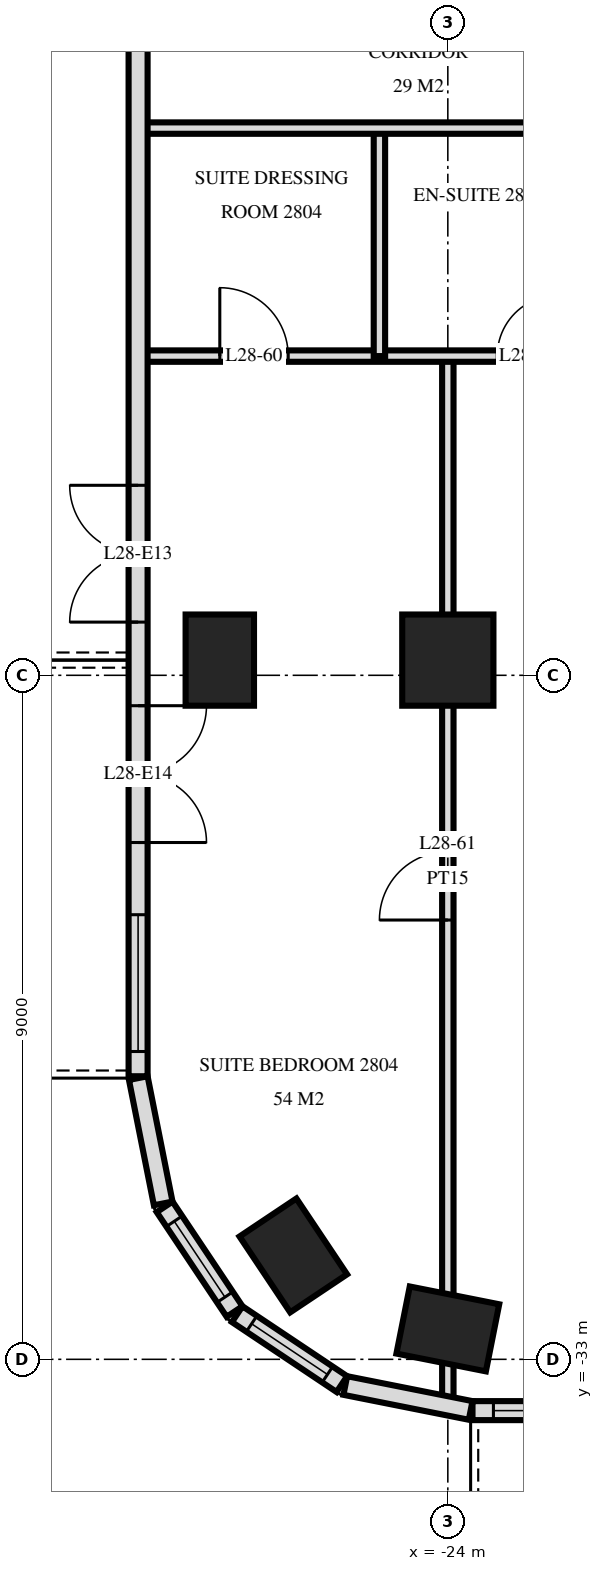
"""IFC4 building model, lengths in metres.
Left out: names, types, materials, properties, quantities, classifications, styles, units other than length and angle.
Written with IfcOpenShell. Run it as: python <this file> out.ifc"""

import sys

from ifc_helpers import new_model, si_unit, direction, frame, frame_2d, origin, origin_2d, place, context, subcontext, project, spatial, rectangle, extrude, element, fill, save


model = new_model("IFC4")
c1 = context("Model", 3, precision=1e-05, world=origin(), true_north=direction((0.0, 1.0)))
c2 = subcontext(c1, "Body", "Model", "MODEL_VIEW")
j1 = project(units=[si_unit("LENGTHUNIT", "METRE"), si_unit("PLANEANGLEUNIT", "RADIAN")], contexts=[c1])
p1 = place(None, origin())
s1 = spatial("IfcSite", under=j1, at=p1, CompositionType="ELEMENT")
p2 = place(p1, origin())
s2 = spatial("IfcBuilding", under=s1, at=p2, CompositionType="ELEMENT")
p3 = place(p2, frame((0.0, 0.0, 112.8)))
s3 = spatial("IfcBuildingStorey", under=s2, at=p3, CompositionType="ELEMENT", Elevation=112.8)
for number, where, z_axis, x_axis in (
    (1, (-27.0, -23.8, -0.28), (0.0, 0.0, 1.0), (0.0, 1.0, 0.0)),
    (2, (-26.033, -31.633, -0.28), (0.0, 0.0, 1.0), (-0.556, 0.831, 0.0)),
    (3, (-24.0, -32.6, -0.28), (0.0, 0.0, 1.0), (-0.981, 0.195, 0.0)),
):
    element("IfcColumn", number, at=place(p3, frame(where, z_axis=z_axis, x_axis=x_axis)), inside=s3, PredefinedType="COLUMN", context=c2, shape_type="SweptSolid", body=[
        extrude(rectangle(XDim=1.2, YDim=0.9, at=origin_2d()), origin(), (0.0, 0.0, 1.0), 3.88),
    ])
p4 = place(p3, frame((-24.0, -23.8, -0.28), z_axis=(0.0, 0.0, 1.0), x_axis=(1.0, 0.0, 0.0)))
e4 = element("IfcColumn", 4, at=p4, inside=s3, PredefinedType="COLUMN", context=c2, shape_type="SweptSolid", body=[
    extrude(rectangle(XDim=1.2, YDim=1.2, at=origin_2d()), origin(), (0.0, 0.0, 1.0), 3.88),
])
p5 = place(p3, frame((-28.075, -3.325, 0.0), z_axis=(0.0, 0.0, 1.0), x_axis=(0.0, -1.0, 0.0)))
e5 = element("IfcWall", 5, at=p5, inside=s3, PredefinedType="SOLIDWALL", context=c2, shape_type="SweptSolid", body=[
    extrude(rectangle(XDim=25.951, YDim=0.25, at=frame_2d((12.975, 0.0))), origin(), (0.0, 0.0, 1.0), 3.32),
])
p6 = place(p5, frame((7.025, 0.0, 0.0)))
e6 = element("IfcOpeningElement", 6, at=p6, cuts=e5, PredefinedType="OPENING", context=c2, shape_type="SweptSolid", body=[
    extrude(rectangle(XDim=1.8, YDim=2.4, at=frame_2d((0.9, 1.2))), frame((0.0, 0.135, 0.0), z_axis=(0.0, -1.0, 0.0), x_axis=(1.0, 0.0, 0.0)), (0.0, 0.0, 1.0), 0.27),
])
p7 = place(p5, frame((18.175, 0.0, 0.0)))
e7 = element("IfcOpeningElement", 7, at=p7, cuts=e5, PredefinedType="OPENING", context=c2, shape_type="SweptSolid", body=[
    extrude(rectangle(XDim=1.8, YDim=2.4, at=frame_2d((0.9, 1.2))), frame((0.0, 0.135, 0.0), z_axis=(0.0, -1.0, 0.0), x_axis=(1.0, 0.0, 0.0)), (0.0, 0.0, 1.0), 0.27),
])
p8 = place(p5, frame((21.075, 0.0, 0.0)))
e8 = element("IfcOpeningElement", 8, at=p8, cuts=e5, PredefinedType="OPENING", context=c2, shape_type="SweptSolid", body=[
    extrude(rectangle(XDim=1.8, YDim=2.4, at=frame_2d((0.9, 1.2))), frame((0.0, 0.135, 0.0), z_axis=(0.0, -1.0, 0.0), x_axis=(1.0, 0.0, 0.0)), (0.0, 0.0, 1.0), 0.27),
])
p9 = place(p5, frame((23.825, 0.0, 0.3)))
e9 = element("IfcOpeningElement", 9, at=p9, cuts=e5, PredefinedType="OPENING", context=c2, shape_type="SweptSolid", body=[
    extrude(rectangle(XDim=1.8, YDim=2.1, at=frame_2d((0.9, 1.05))), frame((0.0, 0.135, 0.0), z_axis=(0.0, -1.0, 0.0), x_axis=(1.0, 0.0, 0.0)), (0.0, 0.0, 1.0), 0.27),
])
p10 = place(p3, frame((-28.073, -29.3, 0.0), z_axis=(0.0, 0.0, 1.0), x_axis=(0.194999110559, -0.980803419081, 0.0)))
e10 = element("IfcWall", 10, at=p10, inside=s3, PredefinedType="SOLIDWALL", context=c2, shape_type="SweptSolid", body=[
    extrude(rectangle(XDim=1.681, YDim=0.25, at=frame_2d((0.841, 0.0))), origin(), (0.0, 0.0, 1.0), 3.32),
])
p11 = place(p3, frame((-27.726, -30.994, 0.0), z_axis=(0.0, 0.0, 1.0), x_axis=(0.55555029066, -0.831482937015, 0.0)))
e11 = element("IfcWall", 11, at=p11, inside=s3, PredefinedType="SOLIDWALL", context=c2, shape_type="SweptSolid", body=[
    extrude(rectangle(XDim=1.656, YDim=0.25, at=frame_2d((0.828, 0.0))), origin(), (0.0, 0.0, 1.0), 3.32),
])
p12 = place(p11, frame((0.228, 0.0, 0.9)))
e12 = element("IfcOpeningElement", 12, at=p12, cuts=e11, PredefinedType="OPENING", context=c2, shape_type="SweptSolid", body=[
    extrude(rectangle(XDim=1.2, YDim=1.5, at=frame_2d((0.6, 0.75))), frame((0.0, 0.135, 0.0), z_axis=(0.0, -1.0, 0.0), x_axis=(1.0, 0.0, 0.0)), (0.0, 0.0, 1.0), 0.27),
])
p13 = place(p3, frame((-26.771, -32.406, 0.0), z_axis=(0.0, 0.0, 1.0), x_axis=(0.831482937015, -0.55555029066, 0.0)))
e13 = element("IfcWall", 13, at=p13, inside=s3, PredefinedType="SOLIDWALL", context=c2, shape_type="SweptSolid", body=[
    extrude(rectangle(XDim=1.656, YDim=0.25, at=frame_2d((0.828, 0.0))), origin(), (0.0, 0.0, 1.0), 3.32),
])
p14 = place(p13, frame((0.228, 0.0, 0.9)))
e14 = element("IfcOpeningElement", 14, at=p14, cuts=e13, PredefinedType="OPENING", context=c2, shape_type="SweptSolid", body=[
    extrude(rectangle(XDim=1.2, YDim=1.5, at=frame_2d((0.6, 0.75))), frame((0.0, 0.135, 0.0), z_axis=(0.0, -1.0, 0.0), x_axis=(1.0, 0.0, 0.0)), (0.0, 0.0, 1.0), 0.27),
])
p15 = place(p3, frame((-25.349, -33.344, 0.0), z_axis=(0.0, 0.0, 1.0), x_axis=(0.980775640221, -0.19513878023, 0.0)))
e15 = element("IfcWall", 15, at=p15, inside=s3, PredefinedType="SOLIDWALL", context=c2, shape_type="SweptSolid", body=[
    extrude(rectangle(XDim=1.681, YDim=0.25, at=frame_2d((0.841, 0.0))), origin(), (0.0, 0.0, 1.0), 3.32),
])
p16 = place(p3, frame((-23.675, -33.675, 0.0), z_axis=(0.0, 0.0, 1.0), x_axis=(1.0, 0.0, 0.0)))
e16 = element("IfcWall", 16, at=p16, inside=s3, PredefinedType="SOLIDWALL", context=c2, shape_type="SweptSolid", body=[
    extrude(rectangle(XDim=47.351, YDim=0.25, at=frame_2d((23.675, 0.0))), origin(), (0.0, 0.0, 1.0), 3.32),
])
p17 = place(p16, frame((0.275, 0.0, 0.3)))
e17 = element("IfcOpeningElement", 17, at=p17, cuts=e16, PredefinedType="OPENING", context=c2, shape_type="SweptSolid", body=[
    extrude(rectangle(XDim=2.4, YDim=2.1, at=frame_2d((1.2, 1.05))), frame((0.0, 0.135, 0.0), z_axis=(0.0, -1.0, 0.0), x_axis=(1.0, 0.0, 0.0)), (0.0, 0.0, 1.0), 0.27),
])
p18 = place(p16, frame((3.425, 0.0, 0.0)))
e18 = element("IfcOpeningElement", 18, at=p18, cuts=e16, PredefinedType="OPENING", context=c2, shape_type="SweptSolid", body=[
    extrude(rectangle(XDim=1.8, YDim=2.4, at=frame_2d((0.9, 1.2))), frame((0.0, 0.135, 0.0), z_axis=(0.0, -1.0, 0.0), x_axis=(1.0, 0.0, 0.0)), (0.0, 0.0, 1.0), 0.27),
])
p19 = place(p16, frame((5.975, 0.0, 0.3)))
e19 = element("IfcOpeningElement", 19, at=p19, cuts=e16, PredefinedType="OPENING", context=c2, shape_type="SweptSolid", body=[
    extrude(rectangle(XDim=2.4, YDim=2.1, at=frame_2d((1.2, 1.05))), frame((0.0, 0.135, 0.0), z_axis=(0.0, -1.0, 0.0), x_axis=(1.0, 0.0, 0.0)), (0.0, 0.0, 1.0), 0.27),
])
p20 = place(p16, frame((9.275, 0.0, 0.0)))
e20 = element("IfcOpeningElement", 20, at=p20, cuts=e16, PredefinedType="OPENING", context=c2, shape_type="SweptSolid", body=[
    extrude(rectangle(XDim=1.8, YDim=2.4, at=frame_2d((0.9, 1.2))), frame((0.0, 0.135, 0.0), z_axis=(0.0, -1.0, 0.0), x_axis=(1.0, 0.0, 0.0)), (0.0, 0.0, 1.0), 0.27),
])
p21 = place(p16, frame((12.275, 0.0, 0.0)))
e21 = element("IfcOpeningElement", 21, at=p21, cuts=e16, PredefinedType="OPENING", context=c2, shape_type="SweptSolid", body=[
    extrude(rectangle(XDim=1.8, YDim=2.4, at=frame_2d((0.9, 1.2))), frame((0.0, 0.135, 0.0), z_axis=(0.0, -1.0, 0.0), x_axis=(1.0, 0.0, 0.0)), (0.0, 0.0, 1.0), 0.27),
])
p22 = place(p16, frame((14.975, 0.0, 0.3)))
e22 = element("IfcOpeningElement", 22, at=p22, cuts=e16, PredefinedType="OPENING", context=c2, shape_type="SweptSolid", body=[
    extrude(rectangle(XDim=2.4, YDim=2.1, at=frame_2d((1.2, 1.05))), frame((0.0, 0.135, 0.0), z_axis=(0.0, -1.0, 0.0), x_axis=(1.0, 0.0, 0.0)), (0.0, 0.0, 1.0), 0.27),
])
p23 = place(p16, frame((17.975, 0.0, 0.3)))
e23 = element("IfcOpeningElement", 23, at=p23, cuts=e16, PredefinedType="OPENING", context=c2, shape_type="SweptSolid", body=[
    extrude(rectangle(XDim=2.4, YDim=2.1, at=frame_2d((1.2, 1.05))), frame((0.0, 0.135, 0.0), z_axis=(0.0, -1.0, 0.0), x_axis=(1.0, 0.0, 0.0)), (0.0, 0.0, 1.0), 0.27),
])
p24 = place(p16, frame((21.275, 0.0, 0.0)))
e24 = element("IfcOpeningElement", 24, at=p24, cuts=e16, PredefinedType="OPENING", context=c2, shape_type="SweptSolid", body=[
    extrude(rectangle(XDim=1.8, YDim=2.4, at=frame_2d((0.9, 1.2))), frame((0.0, 0.135, 0.0), z_axis=(0.0, -1.0, 0.0), x_axis=(1.0, 0.0, 0.0)), (0.0, 0.0, 1.0), 0.27),
])
p25 = place(p16, frame((24.275, 0.0, 0.0)))
e25 = element("IfcOpeningElement", 25, at=p25, cuts=e16, PredefinedType="OPENING", context=c2, shape_type="SweptSolid", body=[
    extrude(rectangle(XDim=1.8, YDim=2.4, at=frame_2d((0.9, 1.2))), frame((0.0, 0.135, 0.0), z_axis=(0.0, -1.0, 0.0), x_axis=(1.0, 0.0, 0.0)), (0.0, 0.0, 1.0), 0.27),
])
p26 = place(p16, frame((26.975, 0.0, 0.3)))
e26 = element("IfcOpeningElement", 26, at=p26, cuts=e16, PredefinedType="OPENING", context=c2, shape_type="SweptSolid", body=[
    extrude(rectangle(XDim=2.4, YDim=2.1, at=frame_2d((1.2, 1.05))), frame((0.0, 0.135, 0.0), z_axis=(0.0, -1.0, 0.0), x_axis=(1.0, 0.0, 0.0)), (0.0, 0.0, 1.0), 0.27),
])
p27 = place(p16, frame((30.275, 0.0, 0.0)))
e27 = element("IfcOpeningElement", 27, at=p27, cuts=e16, PredefinedType="OPENING", context=c2, shape_type="SweptSolid", body=[
    extrude(rectangle(XDim=1.8, YDim=2.4, at=frame_2d((0.9, 1.2))), frame((0.0, 0.135, 0.0), z_axis=(0.0, -1.0, 0.0), x_axis=(1.0, 0.0, 0.0)), (0.0, 0.0, 1.0), 0.27),
])
p28 = place(p16, frame((32.975, 0.0, 0.3)))
e28 = element("IfcOpeningElement", 28, at=p28, cuts=e16, PredefinedType="OPENING", context=c2, shape_type="SweptSolid", body=[
    extrude(rectangle(XDim=2.4, YDim=2.1, at=frame_2d((1.2, 1.05))), frame((0.0, 0.135, 0.0), z_axis=(0.0, -1.0, 0.0), x_axis=(1.0, 0.0, 0.0)), (0.0, 0.0, 1.0), 0.27),
])
p29 = place(p16, frame((35.975, 0.0, 0.3)))
e29 = element("IfcOpeningElement", 29, at=p29, cuts=e16, PredefinedType="OPENING", context=c2, shape_type="SweptSolid", body=[
    extrude(rectangle(XDim=2.4, YDim=2.1, at=frame_2d((1.2, 1.05))), frame((0.0, 0.135, 0.0), z_axis=(0.0, -1.0, 0.0), x_axis=(1.0, 0.0, 0.0)), (0.0, 0.0, 1.0), 0.27),
])
p30 = place(p16, frame((39.275, 0.0, 0.0)))
e30 = element("IfcOpeningElement", 30, at=p30, cuts=e16, PredefinedType="OPENING", context=c2, shape_type="SweptSolid", body=[
    extrude(rectangle(XDim=1.8, YDim=2.4, at=frame_2d((0.9, 1.2))), frame((0.0, 0.135, 0.0), z_axis=(0.0, -1.0, 0.0), x_axis=(1.0, 0.0, 0.0)), (0.0, 0.0, 1.0), 0.27),
])
p31 = place(p16, frame((41.975, 0.0, 0.3)))
e31 = element("IfcOpeningElement", 31, at=p31, cuts=e16, PredefinedType="OPENING", context=c2, shape_type="SweptSolid", body=[
    extrude(rectangle(XDim=2.4, YDim=2.1, at=frame_2d((1.2, 1.05))), frame((0.0, 0.135, 0.0), z_axis=(0.0, -1.0, 0.0), x_axis=(1.0, 0.0, 0.0)), (0.0, 0.0, 1.0), 0.27),
])
p32 = place(p16, frame((45.125, 0.0, 0.0)))
e32 = element("IfcOpeningElement", 32, at=p32, cuts=e16, PredefinedType="OPENING", context=c2, shape_type="SweptSolid", body=[
    extrude(rectangle(XDim=1.8, YDim=2.4, at=frame_2d((0.9, 1.2))), frame((0.0, 0.135, 0.0), z_axis=(0.0, -1.0, 0.0), x_axis=(1.0, 0.0, 0.0)), (0.0, 0.0, 1.0), 0.27),
])
p33 = place(p3, frame((-24.0, -33.557, 0.0), z_axis=(0.0, 0.0, 1.0), x_axis=(0.0, 1.0, 0.0)))
e33 = element("IfcWall", 33, at=p33, inside=s3, PredefinedType="PARTITIONING", context=c2, shape_type="SweptSolid", body=[
    extrude(rectangle(XDim=13.757, YDim=0.15, at=frame_2d((6.878, 0.0))), origin(), (0.0, 0.0, 1.0), 3.32),
])
p34 = place(p33, frame((6.337, 0.0, 0.0)))
e34 = element("IfcOpeningElement", 34, at=p34, cuts=e33, PredefinedType="OPENING", context=c2, shape_type="SweptSolid", body=[
    extrude(rectangle(XDim=0.9, YDim=2.1, at=frame_2d((0.45, 1.05))), frame((0.0, 0.085, 0.0), z_axis=(0.0, -1.0, 0.0), x_axis=(1.0, 0.0, 0.0)), (0.0, 0.0, 1.0), 0.17),
])
p35 = place(p3, frame((-24.9, -19.8, 0.0), z_axis=(0.0, 0.0, 1.0), x_axis=(0.0, 1.0, 0.0)))
e35 = element("IfcWall", 35, at=p35, inside=s3, PredefinedType="PARTITIONING", context=c2, shape_type="SweptSolid", body=[
    extrude(rectangle(XDim=3.0, YDim=0.15, at=frame_2d((1.5, 0.0))), origin(), (0.0, 0.0, 1.0), 3.32),
])
p36 = place(p3, frame((-28.02, -19.8, 0.0), z_axis=(0.0, 0.0, 1.0), x_axis=(1.0, 0.0, 0.0)))
e36 = element("IfcWall", 36, at=p36, inside=s3, PredefinedType="PARTITIONING", context=c2, shape_type="SweptSolid", body=[
    extrude(rectangle(XDim=6.12, YDim=0.15, at=frame_2d((3.06, 0.0))), origin(), (0.0, 0.0, 1.0), 3.32),
])
p37 = place(p36, frame((4.67, 0.0, 0.0)))
e37 = element("IfcOpeningElement", 37, at=p37, cuts=e36, PredefinedType="OPENING", context=c2, shape_type="SweptSolid", body=[
    extrude(rectangle(XDim=0.8, YDim=2.1, at=frame_2d((0.4, 1.05))), frame((0.0, 0.085, 0.0), z_axis=(0.0, -1.0, 0.0), x_axis=(1.0, 0.0, 0.0)), (0.0, 0.0, 1.0), 0.17),
])
p38 = place(p36, frame((1.02, 0.0, 0.0)))
e38 = element("IfcOpeningElement", 38, at=p38, cuts=e36, PredefinedType="OPENING", context=c2, shape_type="SweptSolid", body=[
    extrude(rectangle(XDim=0.9, YDim=2.1, at=frame_2d((0.45, 1.05))), frame((0.0, 0.085, 0.0), z_axis=(0.0, -1.0, 0.0), x_axis=(1.0, 0.0, 0.0)), (0.0, 0.0, 1.0), 0.17),
])
p39 = place(p3, frame((-28.02, -16.8, 0.0), z_axis=(0.0, 0.0, 1.0), x_axis=(1.0, 0.0, 0.0)))
e39 = element("IfcWall", 39, at=p39, inside=s3, PredefinedType="PARTITIONING", context=c2, shape_type="SweptSolid", body=[
    extrude(rectangle(XDim=56.04, YDim=0.15, at=frame_2d((28.02, 0.0))), origin(), (0.0, 0.0, 1.0), 3.32),
])
p40 = place(p39, frame((13.17, 0.0, 0.0)))
e40 = element("IfcOpeningElement", 40, at=p40, cuts=e39, PredefinedType="OPENING", context=c2, shape_type="SweptSolid", body=[
    extrude(rectangle(XDim=1.0, YDim=2.1, at=frame_2d((0.5, 1.05))), frame((0.0, 0.085, 0.0), z_axis=(0.0, -1.0, 0.0), x_axis=(1.0, 0.0, 0.0)), (0.0, 0.0, 1.0), 0.17),
])
p41 = place(p39, frame((11.87, 0.0, 0.0)))
e41 = element("IfcOpeningElement", 41, at=p41, cuts=e39, PredefinedType="OPENING", context=c2, shape_type="SweptSolid", body=[
    extrude(rectangle(XDim=1.0, YDim=2.1, at=frame_2d((0.5, 1.05))), frame((0.0, 0.085, 0.0), z_axis=(0.0, -1.0, 0.0), x_axis=(1.0, 0.0, 0.0)), (0.0, 0.0, 1.0), 0.17),
])
p42 = place(p39, frame((8.32, 0.0, 0.0)))
e42 = element("IfcOpeningElement", 42, at=p42, cuts=e39, PredefinedType="OPENING", context=c2, shape_type="SweptSolid", body=[
    extrude(rectangle(XDim=1.0, YDim=2.1, at=frame_2d((0.5, 1.05))), frame((0.0, 0.085, 0.0), z_axis=(0.0, -1.0, 0.0), x_axis=(1.0, 0.0, 0.0)), (0.0, 0.0, 1.0), 0.17),
])
p43 = place(p39, frame((40.42, 0.0, 0.0)))
e43 = element("IfcOpeningElement", 43, at=p43, cuts=e39, PredefinedType="OPENING", context=c2, shape_type="SweptSolid", body=[
    extrude(rectangle(XDim=1.0, YDim=2.1, at=frame_2d((0.5, 1.05))), frame((0.0, 0.085, 0.0), z_axis=(0.0, -1.0, 0.0), x_axis=(1.0, 0.0, 0.0)), (0.0, 0.0, 1.0), 0.17),
])
p44 = place(p39, frame((46.72, 0.0, 0.0)))
e44 = element("IfcOpeningElement", 44, at=p44, cuts=e39, PredefinedType="OPENING", context=c2, shape_type="SweptSolid", body=[
    extrude(rectangle(XDim=1.0, YDim=2.1, at=frame_2d((0.5, 1.05))), frame((0.0, 0.085, 0.0), z_axis=(0.0, -1.0, 0.0), x_axis=(1.0, 0.0, 0.0)), (0.0, 0.0, 1.0), 0.17),
])
p45 = place(p39, frame((21.52, 0.0, 0.0)))
e45 = element("IfcOpeningElement", 45, at=p45, cuts=e39, PredefinedType="OPENING", context=c2, shape_type="SweptSolid", body=[
    extrude(rectangle(XDim=1.0, YDim=2.1, at=frame_2d((0.5, 1.05))), frame((0.0, 0.085, 0.0), z_axis=(0.0, -1.0, 0.0), x_axis=(1.0, 0.0, 0.0)), (0.0, 0.0, 1.0), 0.17),
])
p46 = place(p39, frame((30.52, 0.0, 0.0)))
e46 = element("IfcOpeningElement", 46, at=p46, cuts=e39, PredefinedType="OPENING", context=c2, shape_type="SweptSolid", body=[
    extrude(rectangle(XDim=1.0, YDim=2.1, at=frame_2d((0.5, 1.05))), frame((0.0, 0.085, 0.0), z_axis=(0.0, -1.0, 0.0), x_axis=(1.0, 0.0, 0.0)), (0.0, 0.0, 1.0), 0.17),
])
p47 = place(p39, frame((36.52, 0.0, 0.0)))
e47 = element("IfcOpeningElement", 47, at=p47, cuts=e39, PredefinedType="OPENING", context=c2, shape_type="SweptSolid", body=[
    extrude(rectangle(XDim=1.0, YDim=2.1, at=frame_2d((0.5, 1.05))), frame((0.0, 0.085, 0.0), z_axis=(0.0, -1.0, 0.0), x_axis=(1.0, 0.0, 0.0)), (0.0, 0.0, 1.0), 0.17),
])
p48 = place(p12, origin())
e48 = element("IfcWindow", 48, at=p48, inside=s3, PartitioningType="SINGLE_PANEL", PredefinedType="WINDOW", context=c2, shape_type="SweptSolid", body=[
    extrude(rectangle(XDim=1.2, YDim=1.5, at=frame_2d((0.6, 0.75))), frame((0.0, 0.03, 0.0), z_axis=(0.0, -1.0, 0.0), x_axis=(1.0, 0.0, 0.0)), (0.0, 0.0, 1.0), 0.06),
])
fill(e12, e48)
p49 = place(p14, origin())
e49 = element("IfcWindow", 49, at=p49, inside=s3, PartitioningType="SINGLE_PANEL", PredefinedType="WINDOW", context=c2, shape_type="SweptSolid", body=[
    extrude(rectangle(XDim=1.2, YDim=1.5, at=frame_2d((0.6, 0.75))), frame((0.0, 0.03, 0.0), z_axis=(0.0, -1.0, 0.0), x_axis=(1.0, 0.0, 0.0)), (0.0, 0.0, 1.0), 0.06),
])
fill(e14, e49)
p50 = place(p17, origin())
e50 = element("IfcWindow", 50, at=p50, inside=s3, PartitioningType="SINGLE_PANEL", PredefinedType="WINDOW", context=c2, shape_type="SweptSolid", body=[
    extrude(rectangle(XDim=2.4, YDim=2.1, at=frame_2d((1.2, 1.05))), frame((0.0, 0.03, 0.0), z_axis=(0.0, -1.0, 0.0), x_axis=(1.0, 0.0, 0.0)), (0.0, 0.0, 1.0), 0.06),
])
fill(e17, e50)
p51 = place(p7, frame((0.9, 0.0, 0.0), z_axis=(0.0, 0.0, 1.0), x_axis=(-1.0, 0.0, 0.0)))
e51 = element("IfcDoor", 51, at=p51, inside=s3, OperationType="DOUBLE_DOOR_SINGLE_SWING", PredefinedType="DOOR", context=c2, shape_type="SweptSolid", body=[
    extrude(rectangle(XDim=1.8, YDim=2.4, at=frame_2d((0.0, 1.2))), frame((0.0, -0.025, 0.0), z_axis=(0.0, 1.0, 0.0), x_axis=(-1.0, 0.0, 0.0)), (0.0, 0.0, 1.0), 0.05),
])
fill(e7, e51)
p52 = place(p8, origin())
e52 = element("IfcDoor", 52, at=p52, inside=s3, OperationType="DOUBLE_DOOR_SINGLE_SWING", PredefinedType="DOOR", context=c2, shape_type="SweptSolid", body=[
    extrude(rectangle(XDim=1.8, YDim=2.4, at=frame_2d((0.9, 1.2))), frame((0.0, 0.025, 0.0), z_axis=(0.0, -1.0, 0.0), x_axis=(1.0, 0.0, 0.0)), (0.0, 0.0, 1.0), 0.05),
])
fill(e8, e52)
p53 = place(p9, origin())
e53 = element("IfcWindow", 53, at=p53, inside=s3, PartitioningType="SINGLE_PANEL", PredefinedType="WINDOW", context=c2, shape_type="SweptSolid", body=[
    extrude(rectangle(XDim=1.8, YDim=2.1, at=frame_2d((0.9, 1.05))), frame((0.0, 0.03, 0.0), z_axis=(0.0, -1.0, 0.0), x_axis=(1.0, 0.0, 0.0)), (0.0, 0.0, 1.0), 0.06),
])
fill(e9, e53)
p54 = place(p37, origin())
e54 = element("IfcDoor", 54, at=p54, inside=s3, OperationType="SINGLE_SWING_LEFT", PredefinedType="DOOR", context=c2, shape_type="SweptSolid", body=[
    extrude(rectangle(XDim=0.8, YDim=2.1, at=frame_2d((0.4, 1.05))), frame((0.0, 0.025, 0.0), z_axis=(0.0, -1.0, 0.0), x_axis=(1.0, 0.0, 0.0)), (0.0, 0.0, 1.0), 0.05),
])
fill(e37, e54)
p55 = place(p38, origin())
e55 = element("IfcDoor", 55, at=p55, inside=s3, OperationType="SINGLE_SWING_RIGHT", PredefinedType="DOOR", context=c2, shape_type="SweptSolid", body=[
    extrude(rectangle(XDim=0.9, YDim=2.1, at=frame_2d((0.45, 1.05))), frame((0.0, 0.025, 0.0), z_axis=(0.0, -1.0, 0.0), x_axis=(1.0, 0.0, 0.0)), (0.0, 0.0, 1.0), 0.05),
])
fill(e38, e55)
p56 = place(p34, origin())
e56 = element("IfcDoor", 56, at=p56, inside=s3, OperationType="SINGLE_SWING_RIGHT", PredefinedType="DOOR", context=c2, shape_type="SweptSolid", body=[
    extrude(rectangle(XDim=0.9, YDim=2.1, at=frame_2d((0.45, 1.05))), frame((0.0, 0.025, 0.0), z_axis=(0.0, -1.0, 0.0), x_axis=(1.0, 0.0, 0.0)), (0.0, 0.0, 1.0), 0.05),
])
fill(e34, e56)
save(model, sys.argv[1])
